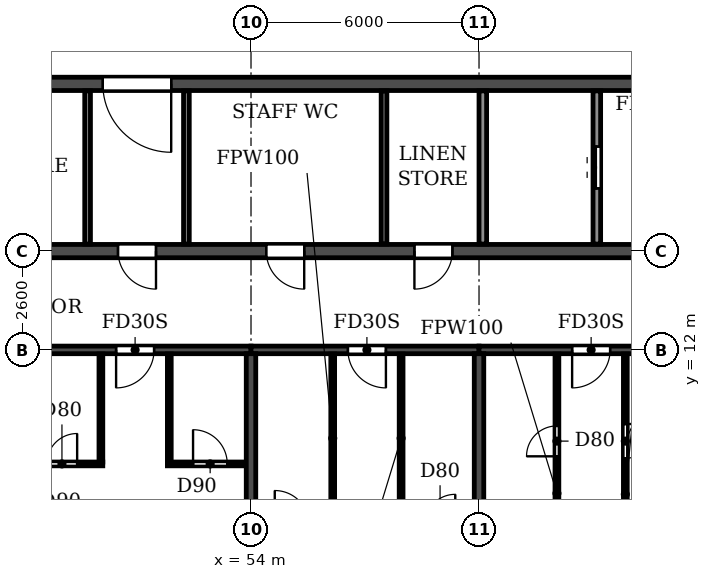
"""IFC4 building model, lengths in metres.
Left out: names, types, materials, properties, quantities, classifications, styles, units other than length and angle.
Written with IfcOpenShell. Run it as: python <this file> out.ifc"""

import sys

from ifc_helpers import new_model, si_unit, direction, frame, frame_2d, origin, place, context, subcontext, project, spatial, rectangle, extrude, element, fill, save


model = new_model("IFC4")
c1 = context("Model", 3, precision=1e-05, world=origin(), true_north=direction((0.0, 1.0)))
c2 = subcontext(c1, "Body", "Model", "MODEL_VIEW")
j1 = project(units=[si_unit("LENGTHUNIT", "METRE"), si_unit("PLANEANGLEUNIT", "RADIAN")], contexts=[c1])
p1 = place(None, origin())
s1 = spatial("IfcSite", under=j1, at=p1, CompositionType="ELEMENT")
p2 = place(p1, origin())
s2 = spatial("IfcBuilding", under=s1, at=p2, CompositionType="ELEMENT")
p3 = place(p2, frame((0.0, 0.0, 231.3)))
s3 = spatial("IfcBuildingStorey", under=s2, at=p3, CompositionType="ELEMENT", Elevation=231.3)
for number, where, z_axis, x_axis in (
    (1, (54.0, 0.2, 0.0), (0.0, 0.0, 1.0), (0.0, 1.0, 0.0)),
    (2, (60.0, 0.2, 0.0), (0.0, 0.0, 1.0), (0.0, 1.0, 0.0)),
):
    element("IfcWall", number, at=place(p3, frame(where, z_axis=z_axis, x_axis=x_axis)), inside=s3, PredefinedType="SHEAR", context=c2, shape_type="SweptSolid", body=[
        extrude(rectangle(XDim=11.7, YDim=0.25, at=frame_2d((5.85, 0.0))), origin(), (0.0, 0.0, 1.0), 3.08),
    ])
p4 = place(p3, frame((48.0, 12.0, 0.0), z_axis=(0.0, 0.0, 1.0), x_axis=(1.0, 0.0, 0.0)))
e3 = element("IfcWall", 3, at=p4, inside=s3, PredefinedType="SHEAR", context=c2, shape_type="SweptSolid", body=[
    extrude(rectangle(XDim=6.0, YDim=0.2, at=frame_2d((3.0, 0.0))), origin(), (0.0, 0.0, 1.0), 2.48),
])
p5 = place(p4, frame((2.45, 0.0, 0.0)))
e4 = element("IfcOpeningElement", 4, at=p5, cuts=e3, PredefinedType="OPENING", context=c2, shape_type="SweptSolid", body=[
    extrude(rectangle(XDim=1.0, YDim=2.1, at=frame_2d((0.5, 1.05))), frame((0.0, 0.11, 0.0), z_axis=(0.0, -1.0, 0.0), x_axis=(1.0, 0.0, 0.0)), (0.0, 0.0, 1.0), 0.22),
])
p6 = place(p3, frame((54.0, 12.0, 0.0), z_axis=(0.0, 0.0, 1.0), x_axis=(1.0, 0.0, 0.0)))
e5 = element("IfcWall", 5, at=p6, inside=s3, PredefinedType="SHEAR", context=c2, shape_type="SweptSolid", body=[
    extrude(rectangle(XDim=6.0, YDim=0.2, at=frame_2d((3.0, 0.0))), origin(), (0.0, 0.0, 1.0), 2.48),
])
p7 = place(p6, frame((2.55, 0.0, 0.0)))
e6 = element("IfcOpeningElement", 6, at=p7, cuts=e5, PredefinedType="OPENING", context=c2, shape_type="SweptSolid", body=[
    extrude(rectangle(XDim=1.0, YDim=2.1, at=frame_2d((0.5, 1.05))), frame((0.0, 0.11, 0.0), z_axis=(0.0, -1.0, 0.0), x_axis=(1.0, 0.0, 0.0)), (0.0, 0.0, 1.0), 0.22),
])
p8 = place(p3, frame((60.0, 12.0, 0.0), z_axis=(0.0, 0.0, 1.0), x_axis=(1.0, 0.0, 0.0)))
e7 = element("IfcWall", 7, at=p8, inside=s3, PredefinedType="SHEAR", context=c2, shape_type="SweptSolid", body=[
    extrude(rectangle(XDim=6.0, YDim=0.2, at=frame_2d((3.0, 0.0))), origin(), (0.0, 0.0, 1.0), 2.48),
])
p9 = place(p8, frame((2.45, 0.0, 0.0)))
e8 = element("IfcOpeningElement", 8, at=p9, cuts=e7, PredefinedType="OPENING", context=c2, shape_type="SweptSolid", body=[
    extrude(rectangle(XDim=1.0, YDim=2.1, at=frame_2d((0.5, 1.05))), frame((0.0, 0.11, 0.0), z_axis=(0.0, -1.0, 0.0), x_axis=(1.0, 0.0, 0.0)), (0.0, 0.0, 1.0), 0.22),
])
p10 = place(p3, frame((18.2, 14.6, 0.0), z_axis=(0.0, 0.0, 1.0), x_axis=(1.0, 0.0, 0.0)))
e9 = element("IfcWall", 9, at=p10, inside=s3, PredefinedType="SOLIDWALL", context=c2, shape_type="SweptSolid", body=[
    extrude(rectangle(XDim=65.6, YDim=0.35, at=frame_2d((32.8, 0.0))), origin(), (0.0, 0.0, 1.0), 3.08),
])
p11 = place(p10, frame((0.7, 0.0, 0.0)))
e10 = element("IfcOpeningElement", 10, at=p11, cuts=e9, PredefinedType="OPENING", context=c2, shape_type="SweptSolid", body=[
    extrude(rectangle(XDim=1.0, YDim=2.1, at=frame_2d((0.5, 1.05))), frame((0.0, 0.185, 0.0), z_axis=(0.0, -1.0, 0.0), x_axis=(1.0, 0.0, 0.0)), (0.0, 0.0, 1.0), 0.37),
])
p12 = place(p10, frame((8.6, 0.0, 0.0)))
e11 = element("IfcOpeningElement", 11, at=p12, cuts=e9, PredefinedType="OPENING", context=c2, shape_type="SweptSolid", body=[
    extrude(rectangle(XDim=1.0, YDim=2.1, at=frame_2d((0.5, 1.05))), frame((0.0, 0.185, 0.0), z_axis=(0.0, -1.0, 0.0), x_axis=(1.0, 0.0, 0.0)), (0.0, 0.0, 1.0), 0.37),
])
p13 = place(p10, frame((13.2, 0.0, 0.0)))
e12 = element("IfcOpeningElement", 12, at=p13, cuts=e9, PredefinedType="OPENING", context=c2, shape_type="SweptSolid", body=[
    extrude(rectangle(XDim=1.0, YDim=2.1, at=frame_2d((0.5, 1.05))), frame((0.0, 0.185, 0.0), z_axis=(0.0, -1.0, 0.0), x_axis=(1.0, 0.0, 0.0)), (0.0, 0.0, 1.0), 0.37),
])
p14 = place(p10, frame((24.5, 0.0, 0.0)))
e13 = element("IfcOpeningElement", 13, at=p14, cuts=e9, PredefinedType="OPENING", context=c2, shape_type="SweptSolid", body=[
    extrude(rectangle(XDim=1.0, YDim=2.1, at=frame_2d((0.5, 1.05))), frame((0.0, 0.185, 0.0), z_axis=(0.0, -1.0, 0.0), x_axis=(1.0, 0.0, 0.0)), (0.0, 0.0, 1.0), 0.37),
])
p15 = place(p10, frame((28.4, 0.0, 0.0)))
e14 = element("IfcOpeningElement", 14, at=p15, cuts=e9, PredefinedType="OPENING", context=c2, shape_type="SweptSolid", body=[
    extrude(rectangle(XDim=1.0, YDim=2.1, at=frame_2d((0.5, 1.05))), frame((0.0, 0.185, 0.0), z_axis=(0.0, -1.0, 0.0), x_axis=(1.0, 0.0, 0.0)), (0.0, 0.0, 1.0), 0.37),
])
p16 = place(p10, frame((32.3, 0.0, 0.0)))
e15 = element("IfcOpeningElement", 15, at=p16, cuts=e9, PredefinedType="OPENING", context=c2, shape_type="SweptSolid", body=[
    extrude(rectangle(XDim=1.0, YDim=2.1, at=frame_2d((0.5, 1.05))), frame((0.0, 0.185, 0.0), z_axis=(0.0, -1.0, 0.0), x_axis=(1.0, 0.0, 0.0)), (0.0, 0.0, 1.0), 0.37),
])
p17 = place(p10, frame((36.2, 0.0, 0.0)))
e16 = element("IfcOpeningElement", 16, at=p17, cuts=e9, PredefinedType="OPENING", context=c2, shape_type="SweptSolid", body=[
    extrude(rectangle(XDim=1.0, YDim=2.1, at=frame_2d((0.5, 1.05))), frame((0.0, 0.185, 0.0), z_axis=(0.0, -1.0, 0.0), x_axis=(1.0, 0.0, 0.0)), (0.0, 0.0, 1.0), 0.37),
])
p18 = place(p10, frame((40.1, 0.0, 0.0)))
e17 = element("IfcOpeningElement", 17, at=p18, cuts=e9, PredefinedType="OPENING", context=c2, shape_type="SweptSolid", body=[
    extrude(rectangle(XDim=1.0, YDim=2.1, at=frame_2d((0.5, 1.05))), frame((0.0, 0.185, 0.0), z_axis=(0.0, -1.0, 0.0), x_axis=(1.0, 0.0, 0.0)), (0.0, 0.0, 1.0), 0.37),
])
p19 = place(p10, frame((51.4, 0.0, 0.0)))
e18 = element("IfcOpeningElement", 18, at=p19, cuts=e9, PredefinedType="OPENING", context=c2, shape_type="SweptSolid", body=[
    extrude(rectangle(XDim=1.0, YDim=2.1, at=frame_2d((0.5, 1.05))), frame((0.0, 0.185, 0.0), z_axis=(0.0, -1.0, 0.0), x_axis=(1.0, 0.0, 0.0)), (0.0, 0.0, 1.0), 0.37),
])
p20 = place(p10, frame((56.0, 0.0, 0.0)))
e19 = element("IfcOpeningElement", 19, at=p20, cuts=e9, PredefinedType="OPENING", context=c2, shape_type="SweptSolid", body=[
    extrude(rectangle(XDim=1.0, YDim=2.1, at=frame_2d((0.5, 1.05))), frame((0.0, 0.185, 0.0), z_axis=(0.0, -1.0, 0.0), x_axis=(1.0, 0.0, 0.0)), (0.0, 0.0, 1.0), 0.37),
])
p21 = place(p10, frame((63.9, 0.0, 0.0)))
e20 = element("IfcOpeningElement", 20, at=p21, cuts=e9, PredefinedType="OPENING", context=c2, shape_type="SweptSolid", body=[
    extrude(rectangle(XDim=1.0, YDim=2.1, at=frame_2d((0.5, 1.05))), frame((0.0, 0.185, 0.0), z_axis=(0.0, -1.0, 0.0), x_axis=(1.0, 0.0, 0.0)), (0.0, 0.0, 1.0), 0.37),
])
p22 = place(p3, frame((33.925, 19.0, 0.0), z_axis=(0.0, 0.0, 1.0), x_axis=(1.0, 0.0, 0.0)))
e21 = element("IfcWall", 21, at=p22, inside=s3, PredefinedType="SOLIDWALL", context=c2, shape_type="SweptSolid", body=[
    extrude(rectangle(XDim=34.15, YDim=0.35, at=frame_2d((17.075, 0.0))), origin(), (0.0, 0.0, 1.0), 3.08),
])
p23 = place(p22, frame((16.175, 0.0, 0.0)))
e22 = element("IfcOpeningElement", 22, at=p23, cuts=e21, PredefinedType="OPENING", context=c2, shape_type="SweptSolid", body=[
    extrude(rectangle(XDim=1.8, YDim=2.1, at=frame_2d((0.9, 1.05))), frame((0.0, 0.185, 0.0), z_axis=(0.0, -1.0, 0.0), x_axis=(1.0, 0.0, 0.0)), (0.0, 0.0, 1.0), 0.37),
])
p24 = place(p22, frame((1.525, 0.0, 0.0)))
e23 = element("IfcOpeningElement", 23, at=p24, cuts=e21, PredefinedType="OPENING", context=c2, shape_type="SweptSolid", body=[
    extrude(rectangle(XDim=1.8, YDim=2.1, at=frame_2d((0.9, 1.05))), frame((0.0, 0.185, 0.0), z_axis=(0.0, -1.0, 0.0), x_axis=(1.0, 0.0, 0.0)), (0.0, 0.0, 1.0), 0.37),
])
p25 = place(p22, frame((30.825, 0.0, 0.0)))
e24 = element("IfcOpeningElement", 24, at=p25, cuts=e21, PredefinedType="OPENING", context=c2, shape_type="SweptSolid", body=[
    extrude(rectangle(XDim=1.8, YDim=2.1, at=frame_2d((0.9, 1.05))), frame((0.0, 0.185, 0.0), z_axis=(0.0, -1.0, 0.0), x_axis=(1.0, 0.0, 0.0)), (0.0, 0.0, 1.0), 0.37),
])
for number, where, z_axis, x_axis in (
    (25, (49.7, 14.785, 0.0), (0.0, 0.0, 1.0), (0.0, 1.0, 0.0)),
    (26, (52.3, 14.785, 0.0), (0.0, 0.0, 1.0), (0.0, 1.0, 0.0)),
):
    element("IfcWall", number, at=place(p3, frame(where, z_axis=z_axis, x_axis=x_axis)), inside=s3, PredefinedType="PARTITIONING", context=c2, shape_type="SweptSolid", body=[
        extrude(rectangle(XDim=4.03, YDim=0.15, at=frame_2d((2.015, 0.0))), origin(), (0.0, 0.0, 1.0), 3.08),
    ])
p26 = place(p3, frame((48.135, 9.0, 0.0), z_axis=(0.0, 0.0, 1.0), x_axis=(1.0, 0.0, 0.0)))
e27 = element("IfcWall", 27, at=p26, inside=s3, PredefinedType="PARTITIONING", context=c2, shape_type="SweptSolid", body=[
    extrude(rectangle(XDim=1.965, YDim=0.1, at=frame_2d((0.982, 0.0))), origin(), (0.0, 0.0, 1.0), 3.08),
])
p27 = place(p26, frame((0.49, 0.0, 0.0)))
e28 = element("IfcOpeningElement", 28, at=p27, cuts=e27, PredefinedType="OPENING", context=c2, shape_type="SweptSolid", body=[
    extrude(rectangle(XDim=0.8, YDim=2.1, at=frame_2d((0.4, 1.05))), frame((0.0, 0.06, 0.0), z_axis=(0.0, -1.0, 0.0), x_axis=(1.0, 0.0, 0.0)), (0.0, 0.0, 1.0), 0.12),
])
p28 = place(p3, frame((51.8, 9.0, 0.0), z_axis=(0.0, 0.0, 1.0), x_axis=(1.0, 0.0, 0.0)))
e29 = element("IfcWall", 29, at=p28, inside=s3, PredefinedType="PARTITIONING", context=c2, shape_type="SweptSolid", body=[
    extrude(rectangle(XDim=2.065, YDim=0.1, at=frame_2d((1.032, 0.0))), origin(), (0.0, 0.0, 1.0), 3.08),
])
p29 = place(p28, frame((0.675, 0.0, 0.0)))
e30 = element("IfcOpeningElement", 30, at=p29, cuts=e29, PredefinedType="OPENING", context=c2, shape_type="SweptSolid", body=[
    extrude(rectangle(XDim=0.9, YDim=2.1, at=frame_2d((0.45, 1.05))), frame((0.0, 0.06, 0.0), z_axis=(0.0, -1.0, 0.0), x_axis=(1.0, 0.0, 0.0)), (0.0, 0.0, 1.0), 0.12),
])
for number, where, z_axis, x_axis in (
    (31, (50.05, 9.05, 0.0), (0.0, 0.0, 1.0), (0.0, 1.0, 0.0)),
    (32, (51.85, 9.05, 0.0), (0.0, 0.0, 1.0), (0.0, 1.0, 0.0)),
):
    element("IfcWall", number, at=place(p3, frame(where, z_axis=z_axis, x_axis=x_axis)), inside=s3, PredefinedType="PARTITIONING", context=c2, shape_type="SweptSolid", body=[
        extrude(rectangle(XDim=2.84, YDim=0.1, at=frame_2d((1.42, 0.0))), origin(), (0.0, 0.0, 1.0), 3.08),
    ])
for number, where, z_axis, x_axis in (
    (33, (56.15, 7.45, 0.0), (0.0, 0.0, 1.0), (0.0, 1.0, 0.0)),
    (34, (57.95, 7.45, 0.0), (0.0, 0.0, 1.0), (0.0, 1.0, 0.0)),
):
    element("IfcWall", number, at=place(p3, frame(where, z_axis=z_axis, x_axis=x_axis)), inside=s3, PredefinedType="PARTITIONING", context=c2, shape_type="SweptSolid", body=[
        extrude(rectangle(XDim=4.44, YDim=0.1, at=frame_2d((2.22, 0.0))), origin(), (0.0, 0.0, 1.0), 3.08),
    ])
p30 = place(p3, frame((62.05, 7.25, 0.0), z_axis=(0.0, 0.0, 1.0), x_axis=(0.0, 1.0, 0.0)))
e35 = element("IfcWall", 35, at=p30, inside=s3, PredefinedType="PARTITIONING", context=c2, shape_type="SweptSolid", body=[
    extrude(rectangle(XDim=4.64, YDim=0.1, at=frame_2d((2.32, 0.0))), origin(), (0.0, 0.0, 1.0), 3.08),
])
p31 = place(p30, frame((1.95, 0.0, 0.0)))
e36 = element("IfcOpeningElement", 36, at=p31, cuts=e35, PredefinedType="OPENING", context=c2, shape_type="SweptSolid", body=[
    extrude(rectangle(XDim=0.8, YDim=2.1, at=frame_2d((0.4, 1.05))), frame((0.0, 0.06, 0.0), z_axis=(0.0, -1.0, 0.0), x_axis=(1.0, 0.0, 0.0)), (0.0, 0.0, 1.0), 0.12),
])
p32 = place(p3, frame((63.85, 7.25, 0.0), z_axis=(0.0, 0.0, 1.0), x_axis=(0.0, 1.0, 0.0)))
e37 = element("IfcWall", 37, at=p32, inside=s3, PredefinedType="PARTITIONING", context=c2, shape_type="SweptSolid", body=[
    extrude(rectangle(XDim=4.64, YDim=0.1, at=frame_2d((2.32, 0.0))), origin(), (0.0, 0.0, 1.0), 3.08),
])
p33 = place(p32, frame((1.9, 0.0, 0.0)))
e38 = element("IfcOpeningElement", 38, at=p33, cuts=e37, PredefinedType="OPENING", context=c2, shape_type="SweptSolid", body=[
    extrude(rectangle(XDim=0.9, YDim=2.1, at=frame_2d((0.45, 1.05))), frame((0.0, 0.06, 0.0), z_axis=(0.0, -1.0, 0.0), x_axis=(1.0, 0.0, 0.0)), (0.0, 0.0, 1.0), 0.12),
])
p34 = place(p3, frame((57.5, 14.785, 0.0), z_axis=(0.0, 0.0, 1.0), x_axis=(0.0, 1.0, 0.0)))
e39 = element("IfcWall", 39, at=p34, inside=s3, PredefinedType="PARTITIONING", context=c2, shape_type="SweptSolid", body=[
    extrude(rectangle(XDim=4.03, YDim=0.15, at=frame_2d((2.015, 0.0))), origin(), (0.0, 0.0, 1.0), 3.08),
])
p35 = place(p3, frame((60.1, 14.785, 0.0), z_axis=(0.0, 0.0, 1.0), x_axis=(0.0, 1.0, 0.0)))
e40 = element("IfcWall", 40, at=p35, inside=s3, PredefinedType="PARTITIONING", context=c2, shape_type="SweptSolid", body=[
    extrude(rectangle(XDim=4.03, YDim=0.2, at=frame_2d((2.015, 0.0))), origin(), (0.0, 0.0, 1.0), 3.08),
])
p36 = place(p3, frame((63.1, 14.785, 0.0), z_axis=(0.0, 0.0, 1.0), x_axis=(0.0, 1.0, 0.0)))
e41 = element("IfcWall", 41, at=p36, inside=s3, PredefinedType="PARTITIONING", context=c2, shape_type="SweptSolid", body=[
    extrude(rectangle(XDim=4.03, YDim=0.2, at=frame_2d((2.015, 0.0))), origin(), (0.0, 0.0, 1.0), 3.08),
])
p37 = place(p36, frame((1.465, 0.0, 0.0)))
e42 = element("IfcOpeningElement", 42, at=p37, cuts=e41, PredefinedType="OPENING", context=c2, shape_type="SweptSolid", body=[
    extrude(rectangle(XDim=1.1, YDim=2.1, at=frame_2d((0.55, 1.05))), frame((0.0, 0.11, 0.0), z_axis=(0.0, -1.0, 0.0), x_axis=(1.0, 0.0, 0.0)), (0.0, 0.0, 1.0), 0.22),
])
p38 = place(p16, frame((1.0, 0.0, 0.0), z_axis=(0.0, 0.0, 1.0), x_axis=(-1.0, 0.0, 0.0)))
e43 = element("IfcDoor", 43, at=p38, inside=s3, OperationType="SINGLE_SWING_LEFT", PredefinedType="DOOR", context=c2, shape_type="SweptSolid", body=[
    extrude(rectangle(XDim=1.0, YDim=2.1, at=frame_2d((0.5, 1.05))), frame((0.0, 0.025, 0.0), z_axis=(0.0, -1.0, 0.0), x_axis=(1.0, 0.0, 0.0)), (0.0, 0.0, 1.0), 0.05),
])
fill(e15, e43)
p39 = place(p17, frame((1.0, 0.0, 0.0), z_axis=(0.0, 0.0, 1.0), x_axis=(-1.0, 0.0, 0.0)))
e44 = element("IfcDoor", 44, at=p39, inside=s3, OperationType="SINGLE_SWING_LEFT", PredefinedType="DOOR", context=c2, shape_type="SweptSolid", body=[
    extrude(rectangle(XDim=1.0, YDim=2.1, at=frame_2d((0.5, 1.05))), frame((0.0, 0.025, 0.0), z_axis=(0.0, -1.0, 0.0), x_axis=(1.0, 0.0, 0.0)), (0.0, 0.0, 1.0), 0.05),
])
fill(e16, e44)
p40 = place(p18, frame((1.0, 0.0, 0.0), z_axis=(0.0, 0.0, 1.0), x_axis=(-1.0, 0.0, 0.0)))
e45 = element("IfcDoor", 45, at=p40, inside=s3, OperationType="SINGLE_SWING_RIGHT", PredefinedType="DOOR", context=c2, shape_type="SweptSolid", body=[
    extrude(rectangle(XDim=1.0, YDim=2.1, at=frame_2d((0.5, 1.05))), frame((0.0, 0.025, 0.0), z_axis=(0.0, -1.0, 0.0), x_axis=(1.0, 0.0, 0.0)), (0.0, 0.0, 1.0), 0.05),
])
fill(e17, e45)
p41 = place(p27, origin())
e46 = element("IfcDoor", 46, at=p41, inside=s3, OperationType="SINGLE_SWING_RIGHT", PredefinedType="DOOR", context=c2, shape_type="SweptSolid", body=[
    extrude(rectangle(XDim=0.8, YDim=2.1, at=frame_2d((0.4, 1.05))), frame((0.0, 0.025, 0.0), z_axis=(0.0, -1.0, 0.0), x_axis=(1.0, 0.0, 0.0)), (0.0, 0.0, 1.0), 0.05),
])
fill(e28, e46)
p42 = place(p5, frame((1.0, 0.0, 0.0), z_axis=(0.0, 0.0, 1.0), x_axis=(-1.0, 0.0, 0.0)))
e47 = element("IfcDoor", 47, at=p42, inside=s3, OperationType="SINGLE_SWING_RIGHT", PredefinedType="DOOR", context=c2, shape_type="SweptSolid", body=[
    extrude(rectangle(XDim=1.0, YDim=2.1, at=frame_2d((0.5, 1.05))), frame((0.0, 0.025, 0.0), z_axis=(0.0, -1.0, 0.0), x_axis=(1.0, 0.0, 0.0)), (0.0, 0.0, 1.0), 0.05),
])
fill(e4, e47)
p43 = place(p29, origin())
e48 = element("IfcDoor", 48, at=p43, inside=s3, OperationType="SINGLE_SWING_LEFT", PredefinedType="DOOR", context=c2, shape_type="SweptSolid", body=[
    extrude(rectangle(XDim=0.9, YDim=2.1, at=frame_2d((0.45, 1.05))), frame((0.0, 0.025, 0.0), z_axis=(0.0, -1.0, 0.0), x_axis=(1.0, 0.0, 0.0)), (0.0, 0.0, 1.0), 0.05),
])
fill(e30, e48)
p44 = place(p7, frame((1.0, 0.0, 0.0), z_axis=(0.0, 0.0, 1.0), x_axis=(-1.0, 0.0, 0.0)))
e49 = element("IfcDoor", 49, at=p44, inside=s3, OperationType="SINGLE_SWING_LEFT", PredefinedType="DOOR", context=c2, shape_type="SweptSolid", body=[
    extrude(rectangle(XDim=1.0, YDim=2.1, at=frame_2d((0.5, 1.05))), frame((0.0, 0.025, 0.0), z_axis=(0.0, -1.0, 0.0), x_axis=(1.0, 0.0, 0.0)), (0.0, 0.0, 1.0), 0.05),
])
fill(e6, e49)
p45 = place(p31, origin())
e50 = element("IfcDoor", 50, at=p45, inside=s3, OperationType="SINGLE_SWING_LEFT", PredefinedType="DOOR", context=c2, shape_type="SweptSolid", body=[
    extrude(rectangle(XDim=0.8, YDim=2.1, at=frame_2d((0.4, 1.05))), frame((0.0, 0.025, 0.0), z_axis=(0.0, -1.0, 0.0), x_axis=(1.0, 0.0, 0.0)), (0.0, 0.0, 1.0), 0.05),
])
fill(e36, e50)
p46 = place(p9, frame((1.0, 0.0, 0.0), z_axis=(0.0, 0.0, 1.0), x_axis=(-1.0, 0.0, 0.0)))
e51 = element("IfcDoor", 51, at=p46, inside=s3, OperationType="SINGLE_SWING_RIGHT", PredefinedType="DOOR", context=c2, shape_type="SweptSolid", body=[
    extrude(rectangle(XDim=1.0, YDim=2.1, at=frame_2d((0.5, 1.05))), frame((0.0, 0.025, 0.0), z_axis=(0.0, -1.0, 0.0), x_axis=(1.0, 0.0, 0.0)), (0.0, 0.0, 1.0), 0.05),
])
fill(e8, e51)
p47 = place(p33, frame((0.9, 0.0, 0.0), z_axis=(0.0, 0.0, 1.0), x_axis=(-1.0, 0.0, 0.0)))
e52 = element("IfcDoor", 52, at=p47, inside=s3, OperationType="SINGLE_SWING_LEFT", PredefinedType="DOOR", context=c2, shape_type="SweptSolid", body=[
    extrude(rectangle(XDim=0.9, YDim=2.1, at=frame_2d((0.45, 1.05))), frame((0.0, 0.025, 0.0), z_axis=(0.0, -1.0, 0.0), x_axis=(1.0, 0.0, 0.0)), (0.0, 0.0, 1.0), 0.05),
])
fill(e38, e52)
p48 = place(p37, origin())
e53 = element("IfcDoor", 53, at=p48, inside=s3, OperationType="DOUBLE_DOOR_SLIDING", PredefinedType="DOOR", context=c2, shape_type="SweptSolid", body=[
    extrude(rectangle(XDim=1.1, YDim=2.1, at=frame_2d((0.55, 1.05))), frame((0.0, 0.025, 0.0), z_axis=(0.0, -1.0, 0.0), x_axis=(1.0, 0.0, 0.0)), (0.0, 0.0, 1.0), 0.05),
])
fill(e42, e53)
p49 = place(p23, frame((1.8, 0.0, 0.0), z_axis=(0.0, 0.0, 1.0), x_axis=(-1.0, 0.0, 0.0)))
e54 = element("IfcDoor", 54, at=p49, inside=s3, OperationType="DOUBLE_DOOR_SINGLE_SWING", PredefinedType="DOOR", context=c2, shape_type="SweptSolid", body=[
    extrude(rectangle(XDim=1.8, YDim=2.1, at=frame_2d((0.9, 1.05))), frame((0.0, 0.025, 0.0), z_axis=(0.0, -1.0, 0.0), x_axis=(1.0, 0.0, 0.0)), (0.0, 0.0, 1.0), 0.05),
])
fill(e22, e54)
save(model, sys.argv[1])
